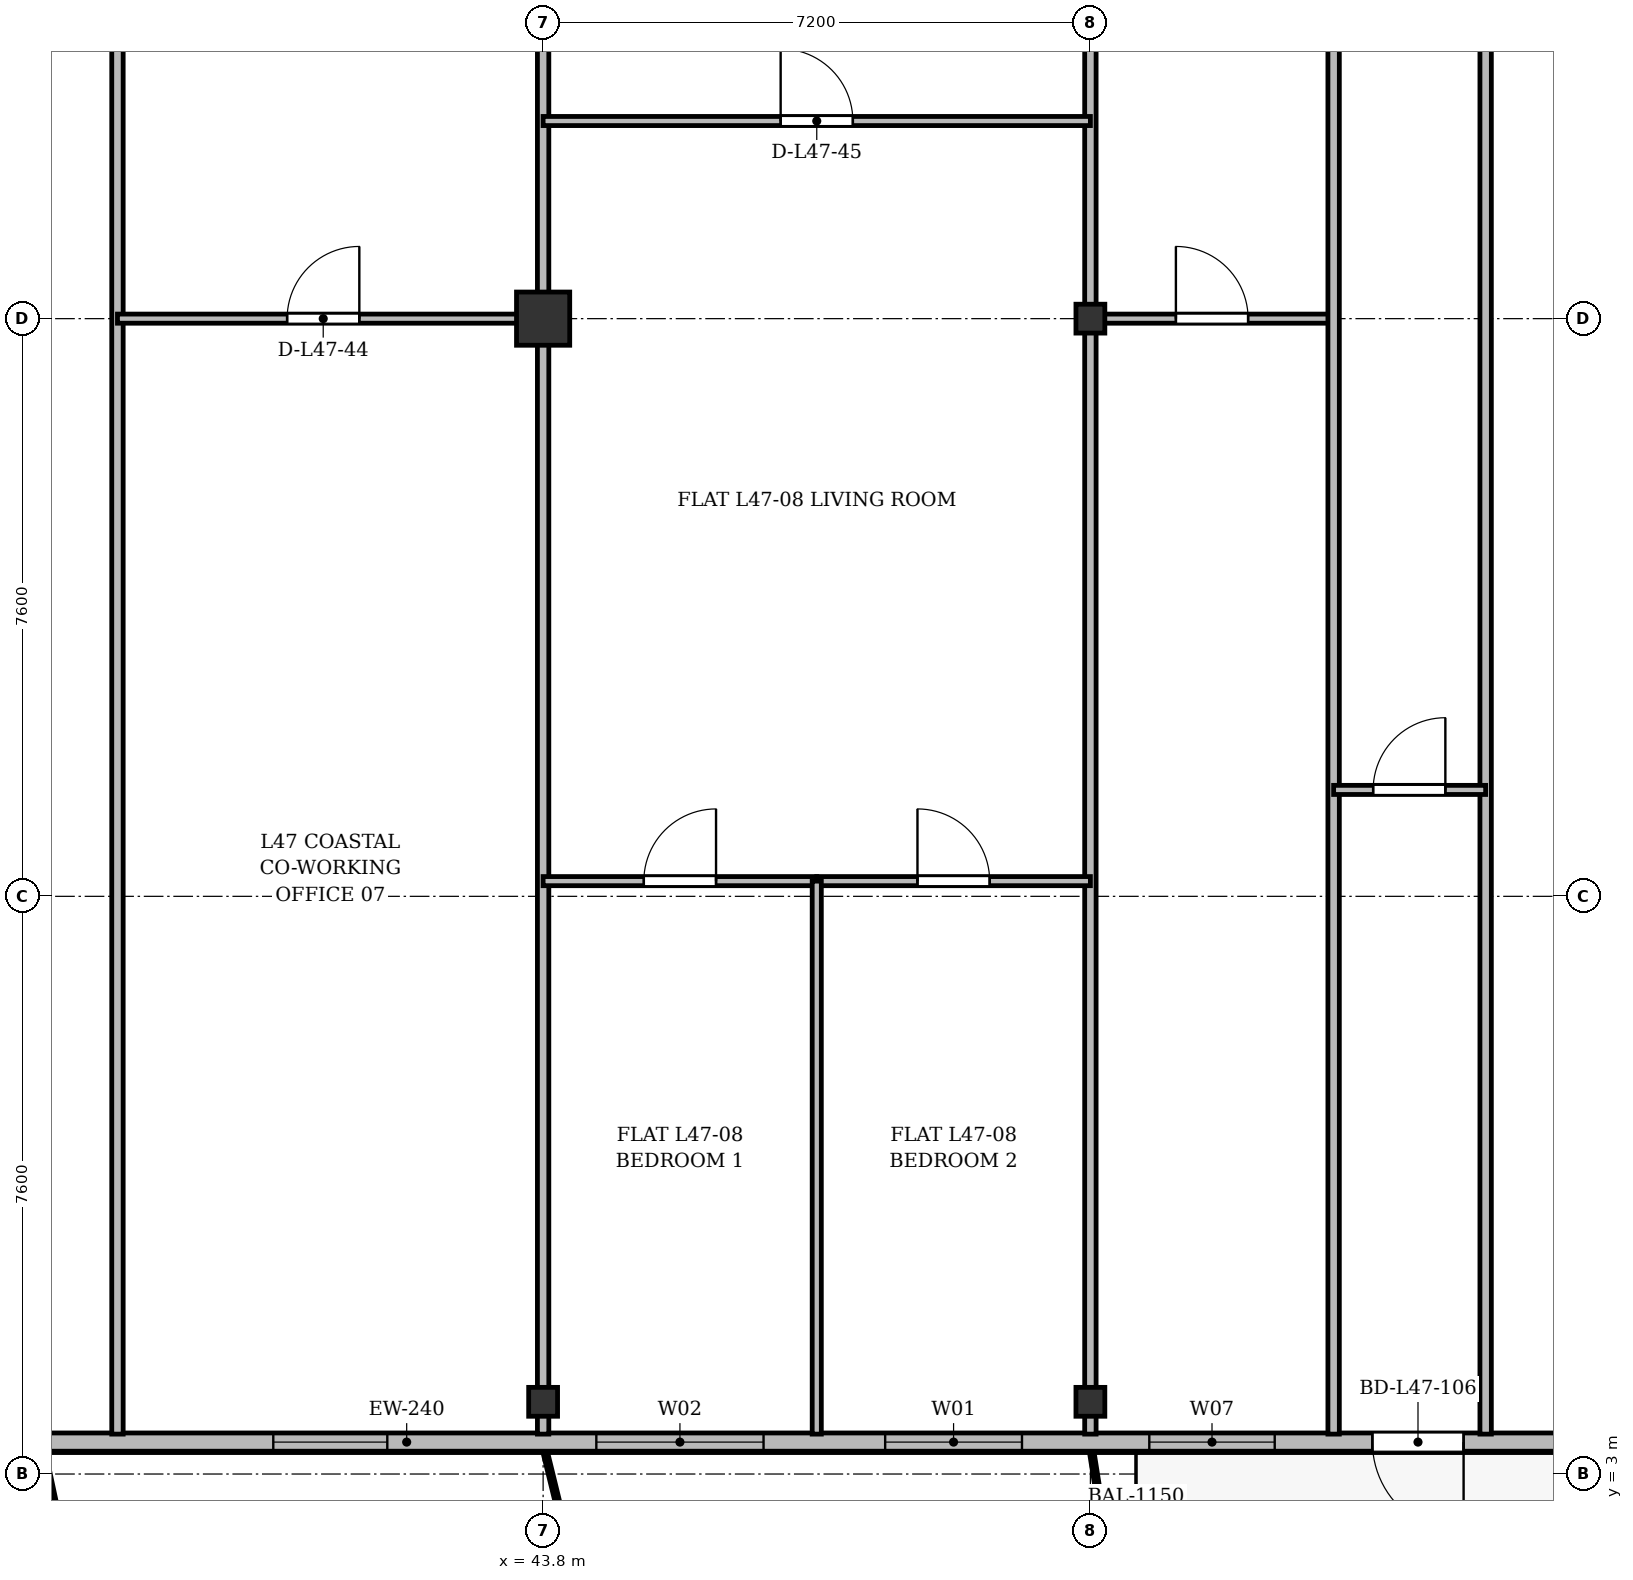
"""IFC4 building model, lengths in metres.
Left out: names, types, materials, properties, quantities, classifications, styles, units other than length and angle.
Written with IfcOpenShell. Run it as: python <this file> out.ifc"""

import sys

from ifc_helpers import new_model, si_unit, direction, frame, frame_2d, origin, origin_2d, place, context, subcontext, project, spatial, rectangle, i_section, extrude, source, transform, mapped, element, fill, save


model = new_model("IFC4")
c1 = context("Model", 3, precision=1e-05, world=origin(), true_north=direction((0.0, 1.0)))
c2 = subcontext(c1, "Body", "Model", "MODEL_VIEW")
j1 = project(units=[si_unit("LENGTHUNIT", "METRE"), si_unit("PLANEANGLEUNIT", "RADIAN")], contexts=[c1])
p1 = place(None, origin())
s1 = spatial("IfcSite", under=j1, at=p1, CompositionType="ELEMENT")
p2 = place(p1, origin())
s2 = spatial("IfcBuilding", under=s1, at=p2, CompositionType="ELEMENT")
p3 = place(p2, frame((0.0, 0.0, 178.9)))
s3 = spatial("IfcBuildingStorey", under=s2, at=p3, CompositionType="ELEMENT", Elevation=178.9)
m1 = source(origin(), c2, "Body", "SweptSolid", [
    extrude(i_section(OverallWidth=0.38, OverallDepth=0.38, WebThickness=0.02, FlangeThickness=0.03, at=origin_2d()), origin(), (0.0, 0.0, 1.0), 3.6),
])
p4 = place(p3, frame((43.8, 3.95, 0.0), z_axis=(0.0, 0.0, 1.0), x_axis=(1.0, 0.0, 0.0)))
e1 = element("IfcColumn", 1, at=p4, inside=s3, PredefinedType="COLUMN", context=c2, shape_type="MappedRepresentation", body=[
    mapped(m1, transform((0.0, 0.0, 0.0), x_axis=(1.0, 0.0, 0.0), y_axis=(0.0, 1.0, 0.0), z_axis=(0.0, 0.0, 1.0), scale=1.0)),
])
m2 = source(origin(), c2, "Body", "SweptSolid", [
    extrude(rectangle(XDim=0.7, YDim=0.7, at=origin_2d()), origin(), (0.0, 0.0, 1.0), 3.6),
])
p5 = place(p3, frame((43.8, 18.2, 0.0), z_axis=(0.0, 0.0, 1.0), x_axis=(1.0, 0.0, 0.0)))
e2 = element("IfcColumn", 2, at=p5, inside=s3, PredefinedType="COLUMN", context=c2, shape_type="MappedRepresentation", body=[
    mapped(m2, transform((0.0, 0.0, 0.0), x_axis=(1.0, 0.0, 0.0), y_axis=(0.0, 1.0, 0.0), z_axis=(0.0, 0.0, 1.0), scale=1.0)),
])
for number, where, z_axis, x_axis in (
    (3, (51.0, 3.95, 0.0), (0.0, 0.0, 1.0), (1.0, 0.0, 0.0)),
    (4, (51.0, 18.2, 0.0), (0.0, 0.0, 1.0), (1.0, 0.0, 0.0)),
):
    element("IfcColumn", number, at=place(p3, frame(where, z_axis=z_axis, x_axis=x_axis)), inside=s3, PredefinedType="COLUMN", context=c2, shape_type="MappedRepresentation", body=[
        mapped(m1, transform((0.0, 0.0, 0.0), x_axis=(1.0, 0.0, 0.0), y_axis=(0.0, 1.0, 0.0), z_axis=(0.0, 0.0, 1.0), scale=1.0)),
    ])
p6 = place(p3, frame((63.6, 3.42, 0.0), z_axis=(0.0, 0.0, 1.0), x_axis=(-1.0, 0.0, 0.0)))
e5 = element("IfcWall", 5, at=p6, inside=s3, PredefinedType="SOLIDWALL", context=c2, shape_type="SweptSolid", body=[
    extrude(rectangle(XDim=34.0, YDim=0.24, at=frame_2d((17.0, 0.0))), origin(), (0.0, 0.0, 1.0), 3.22),
])
p7 = place(p6, frame((2.995, 0.0, 0.9)))
e6 = element("IfcOpeningElement", 6, at=p7, cuts=e5, PredefinedType="OPENING", context=c2, shape_type="SweptSolid", body=[
    extrude(rectangle(XDim=1.5, YDim=1.75, at=frame_2d((0.75, 0.875))), frame((0.0, 0.13, 0.0), z_axis=(0.0, -1.0, 0.0), x_axis=(1.0, 0.0, 0.0)), (0.0, 0.0, 1.0), 0.26),
])
p8 = place(p6, frame((7.69, 0.0, 0.0)))
e7 = element("IfcOpeningElement", 7, at=p8, cuts=e5, PredefinedType="OPENING", context=c2, shape_type="SweptSolid", body=[
    extrude(rectangle(XDim=1.2, YDim=2.2, at=frame_2d((0.6, 1.1))), frame((0.0, 0.13, 0.0), z_axis=(0.0, -1.0, 0.0), x_axis=(1.0, 0.0, 0.0)), (0.0, 0.0, 1.0), 0.26),
])
p9 = place(p6, frame((10.175, 0.0, 0.9)))
e8 = element("IfcOpeningElement", 8, at=p9, cuts=e5, PredefinedType="OPENING", context=c2, shape_type="SweptSolid", body=[
    extrude(rectangle(XDim=1.65, YDim=1.85, at=frame_2d((0.825, 0.925))), frame((0.0, 0.13, 0.0), z_axis=(0.0, -1.0, 0.0), x_axis=(1.0, 0.0, 0.0)), (0.0, 0.0, 1.0), 0.26),
])
p10 = place(p6, frame((13.5, 0.0, 0.9)))
e9 = element("IfcOpeningElement", 9, at=p10, cuts=e5, PredefinedType="OPENING", context=c2, shape_type="SweptSolid", body=[
    extrude(rectangle(XDim=1.8, YDim=1.8, at=frame_2d((0.9, 0.9))), frame((0.0, 0.13, 0.0), z_axis=(0.0, -1.0, 0.0), x_axis=(1.0, 0.0, 0.0)), (0.0, 0.0, 1.0), 0.26),
])
p11 = place(p6, frame((16.9, 0.0, 0.9)))
e10 = element("IfcOpeningElement", 10, at=p11, cuts=e5, PredefinedType="OPENING", context=c2, shape_type="SweptSolid", body=[
    extrude(rectangle(XDim=2.2, YDim=1.8, at=frame_2d((1.1, 0.9))), frame((0.0, 0.13, 0.0), z_axis=(0.0, -1.0, 0.0), x_axis=(1.0, 0.0, 0.0)), (0.0, 0.0, 1.0), 0.26),
])
p12 = place(p6, frame((21.85, 0.0, 0.9)))
e11 = element("IfcOpeningElement", 11, at=p12, cuts=e5, PredefinedType="OPENING", context=c2, shape_type="SweptSolid", body=[
    extrude(rectangle(XDim=1.5, YDim=1.75, at=frame_2d((0.75, 0.875))), frame((0.0, 0.13, 0.0), z_axis=(0.0, -1.0, 0.0), x_axis=(1.0, 0.0, 0.0)), (0.0, 0.0, 1.0), 0.26),
])
p13 = place(p6, frame((28.2, 0.0, 0.9)))
e12 = element("IfcOpeningElement", 12, at=p13, cuts=e5, PredefinedType="OPENING", context=c2, shape_type="SweptSolid", body=[
    extrude(rectangle(XDim=2.0, YDim=1.95, at=frame_2d((1.0, 0.975))), frame((0.0, 0.13, 0.0), z_axis=(0.0, -1.0, 0.0), x_axis=(1.0, 0.0, 0.0)), (0.0, 0.0, 1.0), 0.26),
])
p14 = place(p3, frame((38.2, 3.525, 0.0), z_axis=(0.0, 0.0, 1.0), x_axis=(0.0, 1.0, 0.0)))
e13 = element("IfcWall", 13, at=p14, inside=s3, PredefinedType="PARTITIONING", context=c2, shape_type="SweptSolid", body=[
    extrude(rectangle(XDim=27.275, YDim=0.15, at=frame_2d((13.638, 0.0))), origin(), (0.0, 0.0, 1.0), 2.62),
])
for number, where, z_axis, x_axis in (
    (14, (43.8, 3.525, 0.0), (0.0, 0.0, 1.0), (0.0, 1.0, 0.0)),
    (15, (51.0, 3.525, 0.0), (0.0, 0.0, 1.0), (0.0, 1.0, 0.0)),
):
    element("IfcWall", number, at=place(p3, frame(where, z_axis=z_axis, x_axis=x_axis)), inside=s3, PredefinedType="PARTITIONING", context=c2, shape_type="SweptSolid", body=[
        extrude(rectangle(XDim=27.275, YDim=0.15, at=frame_2d((13.638, 0.0))), origin(), (0.0, 0.0, 1.0), 2.72),
    ])
p15 = place(p3, frame((38.2, 18.2, 0.0), z_axis=(0.0, 0.0, 1.0), x_axis=(1.0, 0.0, 0.0)))
e16 = element("IfcWall", 16, at=p15, inside=s3, PredefinedType="PARTITIONING", context=c2, shape_type="SweptSolid", body=[
    extrude(rectangle(XDim=5.6, YDim=0.12, at=frame_2d((2.8, 0.0))), origin(), (0.0, 0.0, 1.0), 2.62),
])
p16 = place(p15, frame((2.232, 0.0, 0.0)))
e17 = element("IfcOpeningElement", 17, at=p16, cuts=e16, PredefinedType="OPENING", context=c2, shape_type="SweptSolid", body=[
    extrude(rectangle(XDim=0.95, YDim=2.15, at=frame_2d((0.475, 1.075))), frame((0.0, 0.07, 0.0), z_axis=(0.0, -1.0, 0.0), x_axis=(1.0, 0.0, 0.0)), (0.0, 0.0, 1.0), 0.14),
])
p17 = place(p3, frame((43.8, 20.8, 0.0), z_axis=(0.0, 0.0, 1.0), x_axis=(1.0, 0.0, 0.0)))
e18 = element("IfcWall", 18, at=p17, inside=s3, PredefinedType="PARTITIONING", context=c2, shape_type="SweptSolid", body=[
    extrude(rectangle(XDim=7.2, YDim=0.12, at=frame_2d((3.6, 0.0))), origin(), (0.0, 0.0, 1.0), 2.72),
])
p18 = place(p17, frame((3.125, 0.0, 0.0)))
e19 = element("IfcOpeningElement", 19, at=p18, cuts=e18, PredefinedType="OPENING", context=c2, shape_type="SweptSolid", body=[
    extrude(rectangle(XDim=0.95, YDim=2.15, at=frame_2d((0.475, 1.075))), frame((0.0, 0.07, 0.0), z_axis=(0.0, -1.0, 0.0), x_axis=(1.0, 0.0, 0.0)), (0.0, 0.0, 1.0), 0.14),
])
p19 = place(p3, frame((43.8, 10.8, 0.0), z_axis=(0.0, 0.0, 1.0), x_axis=(1.0, 0.0, 0.0)))
e20 = element("IfcWall", 20, at=p19, inside=s3, PredefinedType="PARTITIONING", context=c2, shape_type="SweptSolid", body=[
    extrude(rectangle(XDim=3.6, YDim=0.12, at=frame_2d((1.8, 0.0))), origin(), (0.0, 0.0, 1.0), 2.72),
])
p20 = place(p19, frame((1.325, 0.0, 0.0)))
e21 = element("IfcOpeningElement", 21, at=p20, cuts=e20, PredefinedType="OPENING", context=c2, shape_type="SweptSolid", body=[
    extrude(rectangle(XDim=0.95, YDim=2.15, at=frame_2d((0.475, 1.075))), frame((0.0, 0.07, 0.0), z_axis=(0.0, -1.0, 0.0), x_axis=(1.0, 0.0, 0.0)), (0.0, 0.0, 1.0), 0.14),
])
p21 = place(p3, frame((47.4, 10.8, 0.0), z_axis=(0.0, 0.0, 1.0), x_axis=(1.0, 0.0, 0.0)))
e22 = element("IfcWall", 22, at=p21, inside=s3, PredefinedType="PARTITIONING", context=c2, shape_type="SweptSolid", body=[
    extrude(rectangle(XDim=3.6, YDim=0.12, at=frame_2d((1.8, 0.0))), origin(), (0.0, 0.0, 1.0), 2.72),
])
p22 = place(p21, frame((1.325, 0.0, 0.0)))
e23 = element("IfcOpeningElement", 23, at=p22, cuts=e22, PredefinedType="OPENING", context=c2, shape_type="SweptSolid", body=[
    extrude(rectangle(XDim=0.95, YDim=2.15, at=frame_2d((0.475, 1.075))), frame((0.0, 0.07, 0.0), z_axis=(0.0, -1.0, 0.0), x_axis=(1.0, 0.0, 0.0)), (0.0, 0.0, 1.0), 0.14),
])
p23 = place(p3, frame((47.4, 3.525, 0.0), z_axis=(0.0, 0.0, 1.0), x_axis=(0.0, 1.0, 0.0)))
e24 = element("IfcWall", 24, at=p23, inside=s3, PredefinedType="PARTITIONING", context=c2, shape_type="SweptSolid", body=[
    extrude(rectangle(XDim=7.275, YDim=0.12, at=frame_2d((3.638, 0.0))), origin(), (0.0, 0.0, 1.0), 2.62),
])
p24 = place(p3, frame((51.0, 18.2, 0.0), z_axis=(0.0, 0.0, 1.0), x_axis=(1.0, 0.0, 0.0)))
e25 = element("IfcWall", 25, at=p24, inside=s3, PredefinedType="PARTITIONING", context=c2, shape_type="SweptSolid", body=[
    extrude(rectangle(XDim=3.2, YDim=0.12, at=frame_2d((1.6, 0.0))), origin(), (0.0, 0.0, 1.0), 2.62),
])
p25 = place(p24, frame((1.125, 0.0, 0.0)))
e26 = element("IfcOpeningElement", 26, at=p25, cuts=e25, PredefinedType="OPENING", context=c2, shape_type="SweptSolid", body=[
    extrude(rectangle(XDim=0.95, YDim=2.15, at=frame_2d((0.475, 1.075))), frame((0.0, 0.07, 0.0), z_axis=(0.0, -1.0, 0.0), x_axis=(1.0, 0.0, 0.0)), (0.0, 0.0, 1.0), 0.14),
])
for number, where, z_axis, x_axis in (
    (27, (54.2, 3.525, 0.0), (0.0, 0.0, 1.0), (0.0, 1.0, 0.0)),
    (28, (56.2, 3.525, 0.0), (0.0, 0.0, 1.0), (0.0, 1.0, 0.0)),
):
    element("IfcWall", number, at=place(p3, frame(where, z_axis=z_axis, x_axis=x_axis)), inside=s3, PredefinedType="PARTITIONING", context=c2, shape_type="SweptSolid", body=[
        extrude(rectangle(XDim=27.275, YDim=0.15, at=frame_2d((13.638, 0.0))), origin(), (0.0, 0.0, 1.0), 2.62),
    ])
p26 = place(p3, frame((54.2, 12.0, 0.0), z_axis=(0.0, 0.0, 1.0), x_axis=(1.0, 0.0, 0.0)))
e29 = element("IfcWall", 29, at=p26, inside=s3, PredefinedType="PARTITIONING", context=c2, shape_type="SweptSolid", body=[
    extrude(rectangle(XDim=2.0, YDim=0.12, at=frame_2d((1.0, 0.0))), origin(), (0.0, 0.0, 1.0), 3.22),
])
p27 = place(p26, frame((0.52, 0.0, 0.0)))
e30 = element("IfcOpeningElement", 30, at=p27, cuts=e29, PredefinedType="OPENING", context=c2, shape_type="SweptSolid", body=[
    extrude(rectangle(XDim=0.95, YDim=2.15, at=frame_2d((0.475, 1.075))), frame((0.0, 0.07, 0.0), z_axis=(0.0, -1.0, 0.0), x_axis=(1.0, 0.0, 0.0)), (0.0, 0.0, 1.0), 0.14),
])
m3 = source(origin(), c2, "Body", "SweptSolid", [
    extrude(rectangle(XDim=1.2, YDim=2.2, at=frame_2d((0.6, 1.1))), frame((0.0, 0.025, 0.0), z_axis=(0.0, -1.0, 0.0), x_axis=(1.0, 0.0, 0.0)), (0.0, 0.0, 1.0), 0.05),
])
p28 = place(p8, origin())
e31 = element("IfcDoor", 31, at=p28, inside=s3, OperationType="SINGLE_SWING_LEFT", PredefinedType="DOOR", context=c2, shape_type="MappedRepresentation", body=[
    mapped(m3, transform((0.0, 0.0, 0.0), x_axis=(1.0, 0.0, 0.0), y_axis=(0.0, 1.0, 0.0), z_axis=(0.0, 0.0, 1.0), scale=1.0)),
])
fill(e7, e31)
m4 = source(origin(), c2, "Body", "SweptSolid", [
    extrude(rectangle(XDim=1.65, YDim=1.85, at=frame_2d((0.825, 0.925))), frame((0.0, 0.03, 0.0), z_axis=(0.0, -1.0, 0.0), x_axis=(1.0, 0.0, 0.0)), (0.0, 0.0, 1.0), 0.06),
])
p29 = place(p9, origin())
e32 = element("IfcWindow", 32, at=p29, inside=s3, PartitioningType="SINGLE_PANEL", PredefinedType="WINDOW", context=c2, shape_type="MappedRepresentation", body=[
    mapped(m4, transform((0.0, 0.0, 0.0), x_axis=(1.0, 0.0, 0.0), y_axis=(0.0, 1.0, 0.0), z_axis=(0.0, 0.0, 1.0), scale=1.0)),
])
fill(e8, e32)
m5 = source(origin(), c2, "Body", "SweptSolid", [
    extrude(rectangle(XDim=1.8, YDim=1.8, at=frame_2d((0.9, 0.9))), frame((0.0, 0.03, 0.0), z_axis=(0.0, -1.0, 0.0), x_axis=(1.0, 0.0, 0.0)), (0.0, 0.0, 1.0), 0.06),
])
p30 = place(p10, origin())
e33 = element("IfcWindow", 33, at=p30, inside=s3, PartitioningType="SINGLE_PANEL", PredefinedType="WINDOW", context=c2, shape_type="MappedRepresentation", body=[
    mapped(m5, transform((0.0, 0.0, 0.0), x_axis=(1.0, 0.0, 0.0), y_axis=(0.0, 1.0, 0.0), z_axis=(0.0, 0.0, 1.0), scale=1.0)),
])
fill(e9, e33)
m6 = source(origin(), c2, "Body", "SweptSolid", [
    extrude(rectangle(XDim=2.2, YDim=1.8, at=frame_2d((1.1, 0.9))), frame((0.0, 0.03, 0.0), z_axis=(0.0, -1.0, 0.0), x_axis=(1.0, 0.0, 0.0)), (0.0, 0.0, 1.0), 0.06),
])
p31 = place(p11, origin())
e34 = element("IfcWindow", 34, at=p31, inside=s3, PartitioningType="SINGLE_PANEL", PredefinedType="WINDOW", context=c2, shape_type="MappedRepresentation", body=[
    mapped(m6, transform((0.0, 0.0, 0.0), x_axis=(1.0, 0.0, 0.0), y_axis=(0.0, 1.0, 0.0), z_axis=(0.0, 0.0, 1.0), scale=1.0)),
])
fill(e10, e34)
m7 = source(origin(), c2, "Body", "SweptSolid", [
    extrude(rectangle(XDim=1.5, YDim=1.75, at=frame_2d((0.75, 0.875))), frame((0.0, 0.03, 0.0), z_axis=(0.0, -1.0, 0.0), x_axis=(1.0, 0.0, 0.0)), (0.0, 0.0, 1.0), 0.06),
])
p32 = place(p12, origin())
e35 = element("IfcWindow", 35, at=p32, inside=s3, PartitioningType="SINGLE_PANEL", PredefinedType="WINDOW", context=c2, shape_type="MappedRepresentation", body=[
    mapped(m7, transform((0.0, 0.0, 0.0), x_axis=(1.0, 0.0, 0.0), y_axis=(0.0, 1.0, 0.0), z_axis=(0.0, 0.0, 1.0), scale=1.0)),
])
fill(e11, e35)
m8 = source(origin(), c2, "Body", "SweptSolid", [
    extrude(rectangle(XDim=0.95, YDim=2.15, at=frame_2d((0.475, 1.075))), frame((0.0, 0.025, 0.0), z_axis=(0.0, -1.0, 0.0), x_axis=(1.0, 0.0, 0.0)), (0.0, 0.0, 1.0), 0.05),
])
p33 = place(p16, origin())
e36 = element("IfcDoor", 36, at=p33, inside=s3, OperationType="SINGLE_SWING_RIGHT", PredefinedType="DOOR", context=c2, shape_type="MappedRepresentation", body=[
    mapped(m8, transform((0.0, 0.0, 0.0), x_axis=(1.0, 0.0, 0.0), y_axis=(0.0, 1.0, 0.0), z_axis=(0.0, 0.0, 1.0), scale=1.0)),
])
fill(e17, e36)
p34 = place(p18, origin())
e37 = element("IfcDoor", 37, at=p34, inside=s3, OperationType="SINGLE_SWING_LEFT", PredefinedType="DOOR", context=c2, shape_type="MappedRepresentation", body=[
    mapped(m8, transform((0.0, 0.0, 0.0), x_axis=(1.0, 0.0, 0.0), y_axis=(0.0, 1.0, 0.0), z_axis=(0.0, 0.0, 1.0), scale=1.0)),
])
fill(e19, e37)
p35 = place(p20, origin())
e38 = element("IfcDoor", 38, at=p35, inside=s3, OperationType="SINGLE_SWING_RIGHT", PredefinedType="DOOR", context=c2, shape_type="MappedRepresentation", body=[
    mapped(m8, transform((0.0, 0.0, 0.0), x_axis=(1.0, 0.0, 0.0), y_axis=(0.0, 1.0, 0.0), z_axis=(0.0, 0.0, 1.0), scale=1.0)),
])
fill(e21, e38)
p36 = place(p22, origin())
e39 = element("IfcDoor", 39, at=p36, inside=s3, OperationType="SINGLE_SWING_LEFT", PredefinedType="DOOR", context=c2, shape_type="MappedRepresentation", body=[
    mapped(m8, transform((0.0, 0.0, 0.0), x_axis=(1.0, 0.0, 0.0), y_axis=(0.0, 1.0, 0.0), z_axis=(0.0, 0.0, 1.0), scale=1.0)),
])
fill(e23, e39)
p37 = place(p25, origin())
e40 = element("IfcDoor", 40, at=p37, inside=s3, OperationType="SINGLE_SWING_LEFT", PredefinedType="DOOR", context=c2, shape_type="MappedRepresentation", body=[
    mapped(m8, transform((0.0, 0.0, 0.0), x_axis=(1.0, 0.0, 0.0), y_axis=(0.0, 1.0, 0.0), z_axis=(0.0, 0.0, 1.0), scale=1.0)),
])
fill(e26, e40)
p38 = place(p27, origin())
e41 = element("IfcDoor", 41, at=p38, inside=s3, OperationType="SINGLE_SWING_RIGHT", PredefinedType="DOOR", context=c2, shape_type="MappedRepresentation", body=[
    mapped(m8, transform((0.0, 0.0, 0.0), x_axis=(1.0, 0.0, 0.0), y_axis=(0.0, 1.0, 0.0), z_axis=(0.0, 0.0, 1.0), scale=1.0)),
])
fill(e30, e41)
save(model, sys.argv[1])
